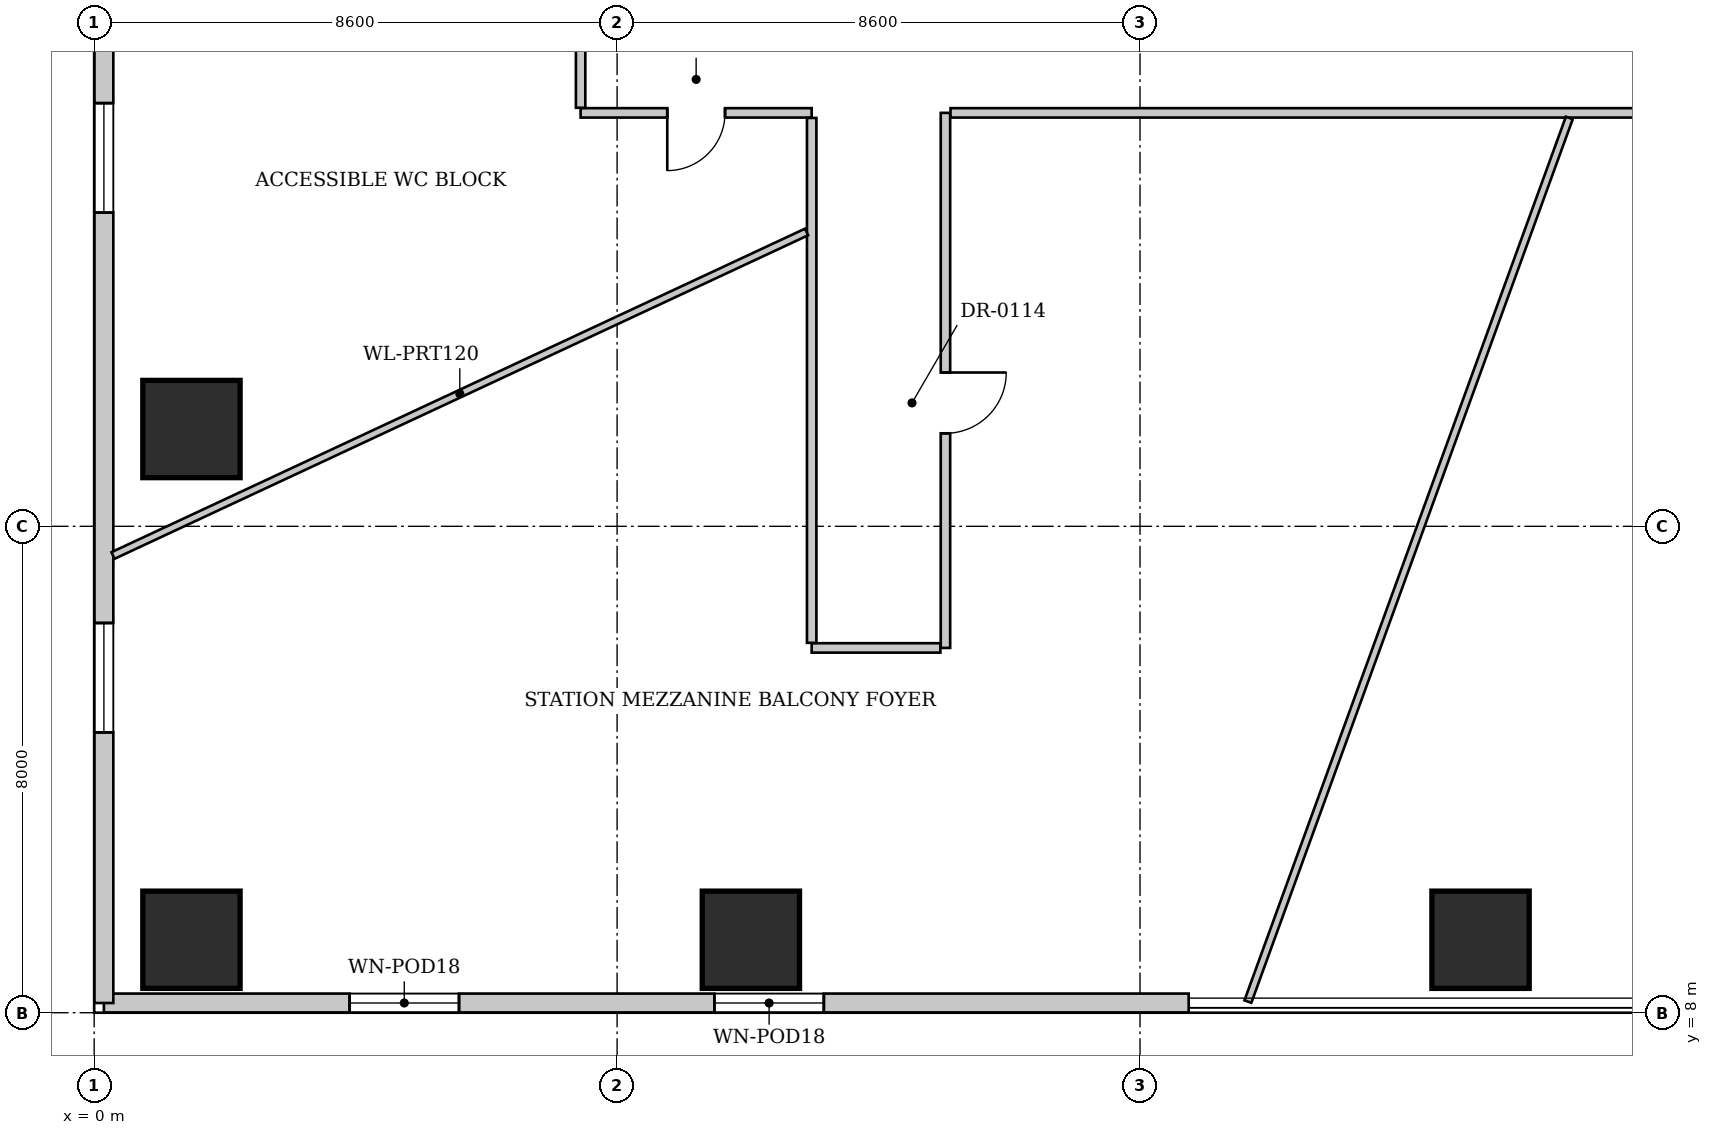
"""IFC4 building model, lengths in metres.
Left out: names, types, materials, properties, quantities, classifications, styles, units other than length and angle.
Written with IfcOpenShell. Run it as: python <this file> out.ifc"""

import sys

from ifc_helpers import new_model, si_unit, direction, frame, frame_2d, origin, origin_2d, place, context, subcontext, project, spatial, rectangle, extrude, source, transform, mapped, element, fill, save


model = new_model("IFC4")
c1 = context("Model", 3, precision=1e-05, world=origin(), true_north=direction((0.0, 1.0)))
c2 = subcontext(c1, "Body", "Model", "MODEL_VIEW")
j1 = project(units=[si_unit("LENGTHUNIT", "METRE"), si_unit("PLANEANGLEUNIT", "RADIAN")], contexts=[c1])
p1 = place(None, origin())
s1 = spatial("IfcSite", under=j1, at=p1, CompositionType="ELEMENT")
p2 = place(p1, origin())
s2 = spatial("IfcBuilding", under=s1, at=p2, CompositionType="ELEMENT")
p3 = place(p2, frame((0.0, 0.0, 5.2)))
s3 = spatial("IfcBuildingStorey", under=s2, at=p3, CompositionType="ELEMENT", Elevation=5.2)
for number, where, z_axis, x_axis in (
    (1, (1.6, 9.2, 0.0), (0.0, 0.0, 1.0), (1.0, 0.0, 0.0)),
    (2, (1.6, 17.6, 0.0), (0.0, 0.0, 1.0), (1.0, 0.0, 0.0)),
    (3, (10.8, 9.2, 0.0), (0.0, 0.0, 1.0), (1.0, 0.0, 0.0)),
    (4, (22.8, 9.2, 0.0), (0.0, 0.0, 1.0), (1.0, 0.0, 0.0)),
):
    element("IfcColumn", number, at=place(p3, frame(where, z_axis=z_axis, x_axis=x_axis)), inside=s3, PredefinedType="COLUMN", context=c2, shape_type="SweptSolid", body=[
        extrude(rectangle(XDim=1.6, YDim=1.6, at=origin_2d()), origin(), (0.0, 0.0, 1.0), 4.3),
    ])
p4 = place(p3, frame((18.0, 8.16, 0.0), z_axis=(0.0, 0.0, 1.0), x_axis=(-1.0, 0.0, 0.0)))
e5 = element("IfcWall", 5, at=p4, inside=s3, PredefinedType="SOLIDWALL", context=c2, shape_type="SweptSolid", body=[
    extrude(rectangle(XDim=17.84, YDim=0.31, at=frame_2d((8.92, 0.0))), origin(), (0.0, 0.0, 1.0), 4.05),
])
p5 = place(p4, frame((6.0, 0.0, 0.95)))
e6 = element("IfcOpeningElement", 6, at=p5, cuts=e5, PredefinedType="OPENING", context=c2, shape_type="SweptSolid", body=[
    extrude(rectangle(XDim=1.8, YDim=2.4, at=frame_2d((0.9, 1.2))), frame((0.0, 0.165, 0.0), z_axis=(0.0, -1.0, 0.0), x_axis=(1.0, 0.0, 0.0)), (0.0, 0.0, 1.0), 0.33),
])
p6 = place(p4, frame((12.0, 0.0, 0.95)))
e7 = element("IfcOpeningElement", 7, at=p6, cuts=e5, PredefinedType="OPENING", context=c2, shape_type="SweptSolid", body=[
    extrude(rectangle(XDim=1.8, YDim=2.4, at=frame_2d((0.9, 1.2))), frame((0.0, 0.165, 0.0), z_axis=(0.0, -1.0, 0.0), x_axis=(1.0, 0.0, 0.0)), (0.0, 0.0, 1.0), 0.33),
])
p7 = place(p3, frame((0.16, 8.16, 0.0), z_axis=(0.0, 0.0, 1.0), x_axis=(0.0, 1.0, 0.0)))
e8 = element("IfcWall", 8, at=p7, inside=s3, PredefinedType="SOLIDWALL", context=c2, shape_type="SweptSolid", body=[
    extrude(rectangle(XDim=39.68, YDim=0.31, at=frame_2d((19.84, 0.0))), origin(), (0.0, 0.0, 1.0), 4.05),
])
p8 = place(p7, frame((4.45, 0.0, 0.95)))
e9 = element("IfcOpeningElement", 9, at=p8, cuts=e8, PredefinedType="OPENING", context=c2, shape_type="SweptSolid", body=[
    extrude(rectangle(XDim=1.8, YDim=2.4, at=frame_2d((0.9, 1.2))), frame((0.0, 0.165, 0.0), z_axis=(0.0, -1.0, 0.0), x_axis=(1.0, 0.0, 0.0)), (0.0, 0.0, 1.0), 0.33),
])
p9 = place(p7, frame((13.0, 0.0, 0.95)))
e10 = element("IfcOpeningElement", 10, at=p9, cuts=e8, PredefinedType="OPENING", context=c2, shape_type="SweptSolid", body=[
    extrude(rectangle(XDim=1.8, YDim=2.4, at=frame_2d((0.9, 1.2))), frame((0.0, 0.165, 0.0), z_axis=(0.0, -1.0, 0.0), x_axis=(1.0, 0.0, 0.0)), (0.0, 0.0, 1.0), 0.33),
])
p10 = place(p7, frame((20.35, 0.0, 0.95)))
e11 = element("IfcOpeningElement", 11, at=p10, cuts=e8, PredefinedType="OPENING", context=c2, shape_type="SweptSolid", body=[
    extrude(rectangle(XDim=1.8, YDim=2.4, at=frame_2d((0.9, 1.2))), frame((0.0, 0.165, 0.0), z_axis=(0.0, -1.0, 0.0), x_axis=(1.0, 0.0, 0.0)), (0.0, 0.0, 1.0), 0.33),
])
p11 = place(p7, frame((31.0, 0.0, 0.95)))
e12 = element("IfcOpeningElement", 12, at=p11, cuts=e8, PredefinedType="OPENING", context=c2, shape_type="SweptSolid", body=[
    extrude(rectangle(XDim=1.8, YDim=2.4, at=frame_2d((0.9, 1.2))), frame((0.0, 0.165, 0.0), z_axis=(0.0, -1.0, 0.0), x_axis=(1.0, 0.0, 0.0)), (0.0, 0.0, 1.0), 0.33),
])
p12 = place(p3, frame((14.0, 22.8, 0.0), z_axis=(0.0, 0.0, 1.0), x_axis=(0.0, -1.0, 0.0)))
e13 = element("IfcWall", 13, at=p12, inside=s3, PredefinedType="PARTITIONING", context=c2, shape_type="SweptSolid", body=[
    extrude(rectangle(XDim=8.8, YDim=0.155, at=frame_2d((4.4, 0.0))), origin(), (0.0, 0.0, 1.0), 4.3),
])
p13 = place(p12, frame((4.271, 0.0, 0.0)))
e14 = element("IfcOpeningElement", 14, at=p13, cuts=e13, PredefinedType="OPENING", context=c2, shape_type="SweptSolid", body=[
    extrude(rectangle(XDim=1.0, YDim=2.15, at=frame_2d((0.5, 1.075))), frame((0.0, 0.087, 0.0), z_axis=(0.0, -1.0, 0.0), x_axis=(1.0, 0.0, 0.0)), (0.0, 0.0, 1.0), 0.175),
])
p14 = place(p3, frame((11.8, 22.8, 0.0), z_axis=(0.0, 0.0, 1.0), x_axis=(-1.0, 0.0, 0.0)))
e15 = element("IfcWall", 15, at=p14, inside=s3, PredefinedType="PARTITIONING", context=c2, shape_type="SweptSolid", body=[
    extrude(rectangle(XDim=3.8, YDim=0.155, at=frame_2d((1.9, 0.0))), origin(), (0.0, 0.0, 1.0), 4.3),
])
p15 = place(p14, frame((1.425, 0.0, 0.0)))
e16 = element("IfcOpeningElement", 16, at=p15, cuts=e15, PredefinedType="OPENING", context=c2, shape_type="SweptSolid", body=[
    extrude(rectangle(XDim=0.95, YDim=2.15, at=frame_2d((0.475, 1.075))), frame((0.0, 0.087, 0.0), z_axis=(0.0, -1.0, 0.0), x_axis=(1.0, 0.0, 0.0)), (0.0, 0.0, 1.0), 0.175),
])
p16 = place(p3, frame((32.717, 22.8, 0.0), z_axis=(0.0, 0.0, 1.0), x_axis=(-1.0, 0.0, 0.0)))
e17 = element("IfcWall", 17, at=p16, inside=s3, PredefinedType="PARTITIONING", context=c2, shape_type="SweptSolid", body=[
    extrude(rectangle(XDim=18.633, YDim=0.155, at=frame_2d((9.316, 0.0))), origin(), (0.0, 0.0, 1.0), 4.3),
])
p17 = place(p3, frame((13.917, 14.0, 0.0), z_axis=(0.0, 0.0, 1.0), x_axis=(-1.0, 0.0, 0.0)))
e18 = element("IfcWall", 18, at=p17, inside=s3, PredefinedType="PARTITIONING", context=c2, shape_type="SweptSolid", body=[
    extrude(rectangle(XDim=2.116, YDim=0.155, at=frame_2d((1.058, 0.0))), origin(), (0.0, 0.0, 1.0), 4.3),
])
p18 = place(p3, frame((11.8, 14.083, 0.0), z_axis=(0.0, 0.0, 1.0), x_axis=(0.0, 1.0, 0.0)))
e19 = element("IfcWall", 19, at=p18, inside=s3, PredefinedType="PARTITIONING", context=c2, shape_type="SweptSolid", body=[
    extrude(rectangle(XDim=8.633, YDim=0.155, at=frame_2d((4.316, 0.0))), origin(), (0.0, 0.0, 1.0), 4.3),
])
p19 = place(p3, frame((8.0, 22.884, 0.0), z_axis=(0.0, 0.0, 1.0), x_axis=(0.0, 1.0, 0.0)))
e20 = element("IfcWall", 20, at=p19, inside=s3, PredefinedType="PARTITIONING", context=c2, shape_type="SweptSolid", body=[
    extrude(rectangle(XDim=3.237, YDim=0.155, at=frame_2d((1.618, 0.0))), origin(), (0.0, 0.0, 1.0), 4.3),
])
p20 = place(p3, frame((11.717, 20.841, 0.0), z_axis=(0.0, 0.0, 1.0), x_axis=(-0.906243586835, -0.422755912225, 0.0)))
e21 = element("IfcWall", 21, at=p20, inside=s3, PredefinedType="PARTITIONING", context=c2, shape_type="SweptSolid", body=[
    extrude(rectangle(XDim=12.587, YDim=0.12, at=frame_2d((6.293, 0.0))), origin(), (0.0, 0.0, 1.0), 4.3),
])
p21 = place(p3, frame((24.26, 22.717, 0.0), z_axis=(0.0, 0.0, 1.0), x_axis=(-0.341796301658, -0.939774062301, 0.0)))
e22 = element("IfcWall", 22, at=p21, inside=s3, PredefinedType="PARTITIONING", context=c2, shape_type="SweptSolid", body=[
    extrude(rectangle(XDim=15.464, YDim=0.12, at=frame_2d((7.732, 0.0))), origin(), (0.0, 0.0, 1.0), 4.3),
])
m1 = source(origin(), c2, "Body", "SweptSolid", [
    extrude(rectangle(XDim=1.8, YDim=2.4, at=frame_2d((0.9, 1.2))), frame((0.0, 0.03, 0.0), z_axis=(0.0, -1.0, 0.0), x_axis=(1.0, 0.0, 0.0)), (0.0, 0.0, 1.0), 0.06),
])
p22 = place(p5, origin())
e23 = element("IfcWindow", 23, at=p22, inside=s3, PartitioningType="SINGLE_PANEL", PredefinedType="WINDOW", context=c2, shape_type="MappedRepresentation", body=[
    mapped(m1, transform((0.0, 0.0, 0.0), x_axis=(1.0, 0.0, 0.0), y_axis=(0.0, 1.0, 0.0), z_axis=(0.0, 0.0, 1.0), scale=1.0)),
])
fill(e6, e23)
p23 = place(p6, origin())
e24 = element("IfcWindow", 24, at=p23, inside=s3, PartitioningType="SINGLE_PANEL", PredefinedType="WINDOW", context=c2, shape_type="MappedRepresentation", body=[
    mapped(m1, transform((0.0, 0.0, 0.0), x_axis=(1.0, 0.0, 0.0), y_axis=(0.0, 1.0, 0.0), z_axis=(0.0, 0.0, 1.0), scale=1.0)),
])
fill(e7, e24)
p24 = place(p8, origin())
e25 = element("IfcWindow", 25, at=p24, inside=s3, PartitioningType="SINGLE_PANEL", PredefinedType="WINDOW", context=c2, shape_type="MappedRepresentation", body=[
    mapped(m1, transform((0.0, 0.0, 0.0), x_axis=(1.0, 0.0, 0.0), y_axis=(0.0, 1.0, 0.0), z_axis=(0.0, 0.0, 1.0), scale=1.0)),
])
fill(e9, e25)
p25 = place(p9, origin())
e26 = element("IfcWindow", 26, at=p25, inside=s3, PartitioningType="SINGLE_PANEL", PredefinedType="WINDOW", context=c2, shape_type="MappedRepresentation", body=[
    mapped(m1, transform((0.0, 0.0, 0.0), x_axis=(1.0, 0.0, 0.0), y_axis=(0.0, 1.0, 0.0), z_axis=(0.0, 0.0, 1.0), scale=1.0)),
])
fill(e10, e26)
m2 = source(origin(), c2, "Body", "SweptSolid", [
    extrude(rectangle(XDim=1.0, YDim=2.15, at=frame_2d((0.5, 1.075))), frame((0.0, 0.025, 0.0), z_axis=(0.0, -1.0, 0.0), x_axis=(1.0, 0.0, 0.0)), (0.0, 0.0, 1.0), 0.05),
])
p26 = place(p13, origin())
e27 = element("IfcDoor", 27, at=p26, inside=s3, OperationType="SINGLE_SWING_LEFT", PredefinedType="DOOR", context=c2, shape_type="MappedRepresentation", body=[
    mapped(m2, transform((0.0, 0.0, 0.0), x_axis=(1.0, 0.0, 0.0), y_axis=(0.0, 1.0, 0.0), z_axis=(0.0, 0.0, 1.0), scale=1.0)),
])
fill(e14, e27)
m3 = source(origin(), c2, "Body", "SweptSolid", [
    extrude(rectangle(XDim=0.95, YDim=2.15, at=frame_2d((0.475, 1.075))), frame((0.0, 0.025, 0.0), z_axis=(0.0, -1.0, 0.0), x_axis=(1.0, 0.0, 0.0)), (0.0, 0.0, 1.0), 0.05),
])
p27 = place(p15, origin())
e28 = element("IfcDoor", 28, at=p27, inside=s3, OperationType="SINGLE_SWING_RIGHT", PredefinedType="DOOR", context=c2, shape_type="MappedRepresentation", body=[
    mapped(m3, transform((0.0, 0.0, 0.0), x_axis=(1.0, 0.0, 0.0), y_axis=(0.0, 1.0, 0.0), z_axis=(0.0, 0.0, 1.0), scale=1.0)),
])
fill(e16, e28)
save(model, sys.argv[1])
